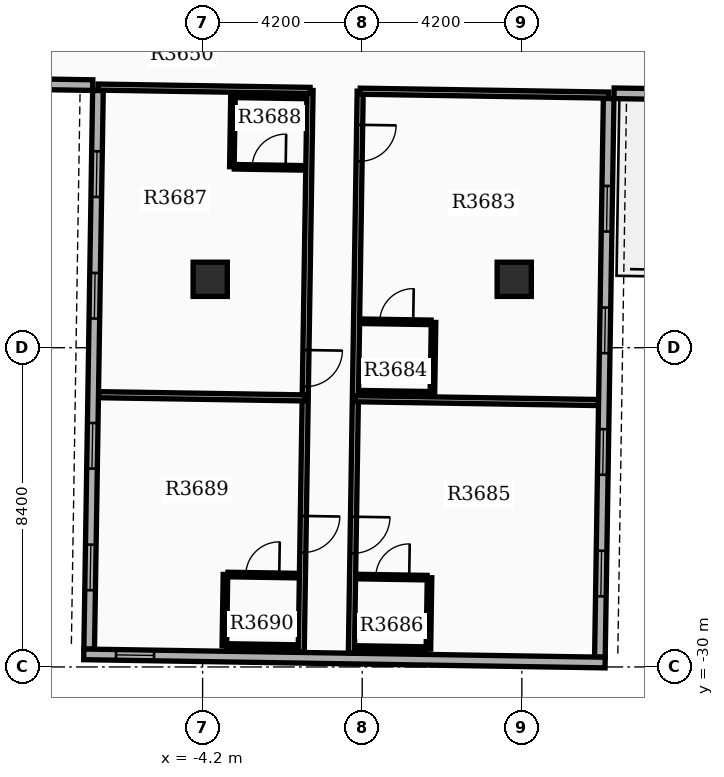
"""IFC4 building model, lengths in metres.
Left out: names, types, materials, properties, quantities, classifications, styles, units other than length and angle.
Written with IfcOpenShell. Run it as: python <this file> out.ifc"""

import sys

from ifc_helpers import new_model, si_unit, direction, frame, frame_2d, origin, origin_2d, place, context, subcontext, project, spatial, rectangle, extrude, element, fill, save


model = new_model("IFC4")
c1 = context("Model", 3, precision=1e-05, world=origin(), true_north=direction((0.0, 1.0)))
c2 = subcontext(c1, "Body", "Model", "MODEL_VIEW")
j1 = project(units=[si_unit("LENGTHUNIT", "METRE"), si_unit("PLANEANGLEUNIT", "RADIAN")], contexts=[c1])
p1 = place(None, origin())
s1 = spatial("IfcSite", under=j1, at=p1, CompositionType="ELEMENT")
p2 = place(p1, origin())
s2 = spatial("IfcBuilding", under=s1, at=p2, CompositionType="ELEMENT")
p3 = place(p2, frame((0.0, 0.0, 228.6)))
s3 = spatial("IfcBuildingStorey", under=s2, at=p3, CompositionType="ELEMENT", Elevation=228.6)
for number, where, z_axis, x_axis in (
    (1, (-4.0, -19.8, 0.0), (0.0, 0.0, 1.0), (1.0, 0.0, 0.0)),
    (2, (4.0, -19.8, 0.0), (0.0, 0.0, 1.0), (1.0, 0.0, 0.0)),
):
    element("IfcColumn", number, at=place(p3, frame(where, z_axis=z_axis, x_axis=x_axis)), inside=s3, PredefinedType="COLUMN", context=c2, shape_type="SweptSolid", body=[
        extrude(rectangle(XDim=0.9, YDim=0.9, at=origin_2d()), origin(), (0.0, 0.0, 1.0), 3.9),
    ])
p4 = place(p3, frame((-6.954, -14.833, 0.0), z_axis=(0.0, 0.0, 1.0), x_axis=(-0.015711302158, -0.999876569875, 0.0)))
e3 = element("IfcWall", 3, at=p4, inside=s3, PredefinedType="STANDARD", context=c2, shape_type="SweptSolid", body=[
    extrude(rectangle(XDim=14.7, YDim=0.28, at=frame_2d((7.35, 0.0))), origin(), (0.0, 0.0, 1.0), 3.18),
])
p5 = place(p4, frame((1.6, 0.0, 0.8)))
e4 = element("IfcOpeningElement", 4, at=p5, cuts=e3, PredefinedType="OPENING", context=c2, shape_type="SweptSolid", body=[
    extrude(rectangle(XDim=1.2, YDim=1.6, at=frame_2d((0.6, 0.8))), frame((0.0, 0.15, 0.0), z_axis=(0.0, -1.0, 0.0), x_axis=(1.0, 0.0, 0.0)), (0.0, 0.0, 1.0), 0.3),
])
p6 = place(p4, frame((4.8, 0.0, 0.8)))
e5 = element("IfcOpeningElement", 5, at=p6, cuts=e3, PredefinedType="OPENING", context=c2, shape_type="SweptSolid", body=[
    extrude(rectangle(XDim=1.2, YDim=1.6, at=frame_2d((0.6, 0.8))), frame((0.0, 0.15, 0.0), z_axis=(0.0, -1.0, 0.0), x_axis=(1.0, 0.0, 0.0)), (0.0, 0.0, 1.0), 0.3),
])
p7 = place(p4, frame((8.75, 0.0, 0.8)))
e6 = element("IfcOpeningElement", 6, at=p7, cuts=e3, PredefinedType="OPENING", context=c2, shape_type="SweptSolid", body=[
    extrude(rectangle(XDim=1.2, YDim=1.6, at=frame_2d((0.6, 0.8))), frame((0.0, 0.15, 0.0), z_axis=(0.0, -1.0, 0.0), x_axis=(1.0, 0.0, 0.0)), (0.0, 0.0, 1.0), 0.3),
])
p8 = place(p4, frame((11.95, 0.0, 0.8)))
e7 = element("IfcOpeningElement", 7, at=p8, cuts=e3, PredefinedType="OPENING", context=c2, shape_type="SweptSolid", body=[
    extrude(rectangle(XDim=1.2, YDim=1.6, at=frame_2d((0.6, 0.8))), frame((0.0, 0.15, 0.0), z_axis=(0.0, -1.0, 0.0), x_axis=(1.0, 0.0, 0.0)), (0.0, 0.0, 1.0), 0.3),
])
p9 = place(p3, frame((6.254, -29.742, 0.0), z_axis=(0.0, 0.0, 1.0), x_axis=(0.015711302158, 0.999876569875, 0.0)))
e8 = element("IfcWall", 8, at=p9, inside=s3, PredefinedType="STANDARD", context=c2, shape_type="SweptSolid", body=[
    extrude(rectangle(XDim=14.7, YDim=0.28, at=frame_2d((7.35, 0.0))), origin(), (0.0, 0.0, 1.0), 3.18),
])
p10 = place(p9, frame((1.6, 0.0, 0.8)))
e9 = element("IfcOpeningElement", 9, at=p10, cuts=e8, PredefinedType="OPENING", context=c2, shape_type="SweptSolid", body=[
    extrude(rectangle(XDim=1.2, YDim=1.6, at=frame_2d((0.6, 0.8))), frame((0.0, 0.15, 0.0), z_axis=(0.0, -1.0, 0.0), x_axis=(1.0, 0.0, 0.0)), (0.0, 0.0, 1.0), 0.3),
])
p11 = place(p9, frame((4.8, 0.0, 0.8)))
e10 = element("IfcOpeningElement", 10, at=p11, cuts=e8, PredefinedType="OPENING", context=c2, shape_type="SweptSolid", body=[
    extrude(rectangle(XDim=1.2, YDim=1.6, at=frame_2d((0.6, 0.8))), frame((0.0, 0.15, 0.0), z_axis=(0.0, -1.0, 0.0), x_axis=(1.0, 0.0, 0.0)), (0.0, 0.0, 1.0), 0.3),
])
p12 = place(p9, frame((8.0, 0.0, 0.8)))
e11 = element("IfcOpeningElement", 11, at=p12, cuts=e8, PredefinedType="OPENING", context=c2, shape_type="SweptSolid", body=[
    extrude(rectangle(XDim=1.2, YDim=1.6, at=frame_2d((0.6, 0.8))), frame((0.0, 0.15, 0.0), z_axis=(0.0, -1.0, 0.0), x_axis=(1.0, 0.0, 0.0)), (0.0, 0.0, 1.0), 0.3),
])
p13 = place(p9, frame((11.2, 0.0, 0.8)))
e12 = element("IfcOpeningElement", 12, at=p13, cuts=e8, PredefinedType="OPENING", context=c2, shape_type="SweptSolid", body=[
    extrude(rectangle(XDim=1.2, YDim=1.6, at=frame_2d((0.6, 0.8))), frame((0.0, 0.15, 0.0), z_axis=(0.0, -1.0, 0.0), x_axis=(1.0, 0.0, 0.0)), (0.0, 0.0, 1.0), 0.3),
])
p14 = place(p3, frame((-7.327, -29.669, 0.0), z_axis=(0.0, 0.0, 1.0), x_axis=(0.999876828887, -0.015694809807, 0.0)))
e13 = element("IfcWall", 13, at=p14, inside=s3, PredefinedType="STANDARD", context=c2, shape_type="SweptSolid", body=[
    extrude(rectangle(XDim=13.72, YDim=0.28, at=frame_2d((6.86, 0.0))), origin(), (0.0, 0.0, 1.0), 3.18),
])
p15 = place(p14, frame((0.85, 0.0, 0.85)))
e14 = element("IfcOpeningElement", 14, at=p15, cuts=e13, PredefinedType="OPENING", context=c2, shape_type="SweptSolid", body=[
    extrude(rectangle(XDim=1.0, YDim=1.5, at=frame_2d((0.5, 0.75))), frame((0.0, 0.15, 0.0), z_axis=(0.0, -1.0, 0.0), x_axis=(1.0, 0.0, 0.0)), (0.0, 0.0, 1.0), 0.3),
])
p16 = place(p3, frame((-13.391, -14.592, 0.0), z_axis=(0.0, 0.0, 1.0), x_axis=(0.999876833368, -0.015694524359, 0.0)))
e15 = element("IfcWall", 15, at=p16, inside=s3, PredefinedType="STANDARD", context=c2, shape_type="SweptSolid", body=[
    extrude(rectangle(XDim=6.3, YDim=0.28, at=frame_2d((3.15, 0.0))), origin(), (0.0, 0.0, 1.0), 3.18),
])
p17 = place(p3, frame((12.926, -15.005, 0.0), z_axis=(0.0, 0.0, 1.0), x_axis=(-0.999876823822, 0.015695132501, 0.0)))
e16 = element("IfcWall", 16, at=p17, inside=s3, PredefinedType="STANDARD", context=c2, shape_type="SweptSolid", body=[
    extrude(rectangle(XDim=6.3, YDim=0.28, at=frame_2d((3.15, 0.0))), origin(), (0.0, 0.0, 1.0), 3.18),
])
p18 = place(p3, frame((-0.053, -14.851, 0.0), z_axis=(0.0, 0.0, 1.0), x_axis=(-0.015706944004, -0.999876638346, 0.0)))
e17 = element("IfcWall", 17, at=p18, inside=s3, PredefinedType="PARTITIONING", context=c2, shape_type="SweptSolid", body=[
    extrude(rectangle(XDim=14.782, YDim=0.16, at=frame_2d((7.391, 0.0))), origin(), (0.0, 0.0, 1.0), 3.17),
])
p19 = place(p18, frame((0.884, 0.0, 0.0)))
e18 = element("IfcOpeningElement", 18, at=p19, cuts=e17, PredefinedType="OPENING", context=c2, shape_type="SweptSolid", body=[
    extrude(rectangle(XDim=0.96, YDim=2.15, at=frame_2d((0.48, 1.075))), frame((0.0, 0.09, 0.0), z_axis=(0.0, -1.0, 0.0), x_axis=(1.0, 0.0, 0.0)), (0.0, 0.0, 1.0), 0.18),
])
p20 = place(p18, frame((11.198, 0.0, 0.0)))
e19 = element("IfcOpeningElement", 19, at=p20, cuts=e17, PredefinedType="OPENING", context=c2, shape_type="SweptSolid", body=[
    extrude(rectangle(XDim=0.96, YDim=2.15, at=frame_2d((0.48, 1.075))), frame((0.0, 0.09, 0.0), z_axis=(0.0, -1.0, 0.0), x_axis=(1.0, 0.0, 0.0)), (0.0, 0.0, 1.0), 0.18),
])
p21 = place(p3, frame((-0.053, -14.851, 0.0), z_axis=(0.0, 0.0, 1.0), x_axis=(0.999877075733, -0.015679076008, 0.0)))
e20 = element("IfcWall", 20, at=p21, inside=s3, PredefinedType="PARTITIONING", context=c2, shape_type="SweptSolid", body=[
    extrude(rectangle(XDim=6.54, YDim=0.16, at=frame_2d((3.27, 0.0))), origin(), (0.0, 0.0, 1.0), 3.17),
])
p22 = place(p3, frame((-0.18, -22.942, 0.0), z_axis=(0.0, 0.0, 1.0), x_axis=(0.999876174287, -0.015736457476, 0.0)))
e21 = element("IfcWall", 21, at=p22, inside=s3, PredefinedType="PARTITIONING", context=c2, shape_type="SweptSolid", body=[
    extrude(rectangle(XDim=6.392, YDim=0.16, at=frame_2d((3.196, 0.0))), origin(), (0.0, 0.0, 1.0), 3.17),
])
p23 = place(p3, frame((-0.008, -20.904, 0.0), z_axis=(0.0, 0.0, 1.0), x_axis=(0.999874688728, -0.015830566654, 0.0)))
e22 = element("IfcWall", 22, at=p23, inside=s3, PredefinedType="PARTITIONING", context=c2, shape_type="SweptSolid", body=[
    extrude(rectangle(XDim=1.82, YDim=0.12, at=frame_2d((0.91, 0.0))), origin(), (0.0, 0.0, 1.0), 3.17),
])
p24 = place(p23, frame((0.47, 0.0, 0.0)))
e23 = element("IfcOpeningElement", 23, at=p24, cuts=e22, PredefinedType="OPENING", context=c2, shape_type="SweptSolid", body=[
    extrude(rectangle(XDim=0.88, YDim=2.1, at=frame_2d((0.44, 1.05))), frame((0.0, 0.07, 0.0), z_axis=(0.0, -1.0, 0.0), x_axis=(1.0, 0.0, 0.0)), (0.0, 0.0, 1.0), 0.14),
])
p25 = place(p3, frame((-0.038, -22.784, 0.0), z_axis=(0.0, 0.0, 1.0), x_axis=(0.999876836305, -0.015694337248, 0.0)))
e24 = element("IfcWall", 24, at=p25, inside=s3, PredefinedType="PARTITIONING", context=c2, shape_type="SweptSolid", body=[
    extrude(rectangle(XDim=1.82, YDim=0.12, at=frame_2d((0.91, 0.0))), origin(), (0.0, 0.0, 1.0), 3.17),
])
p26 = place(p3, frame((1.876, -20.934, 0.0), z_axis=(0.0, 0.0, 1.0), x_axis=(-0.015714386166, -0.99987652141, 0.0)))
e25 = element("IfcWall", 25, at=p26, inside=s3, PredefinedType="PARTITIONING", context=c2, shape_type="SweptSolid", body=[
    extrude(rectangle(XDim=1.88, YDim=0.12, at=frame_2d((0.94, 0.0))), origin(), (0.0, 0.0, 1.0), 3.17),
])
p27 = place(p3, frame((-0.114, -27.622, 0.0), z_axis=(0.0, 0.0, 1.0), x_axis=(0.999876836305, -0.015694337248, 0.0)))
e26 = element("IfcWall", 26, at=p27, inside=s3, PredefinedType="PARTITIONING", context=c2, shape_type="SweptSolid", body=[
    extrude(rectangle(XDim=1.82, YDim=0.12, at=frame_2d((0.91, 0.0))), origin(), (0.0, 0.0, 1.0), 3.17),
])
p28 = place(p27, frame((0.47, 0.0, 0.0)))
e27 = element("IfcOpeningElement", 27, at=p28, cuts=e26, PredefinedType="OPENING", context=c2, shape_type="SweptSolid", body=[
    extrude(rectangle(XDim=0.88, YDim=2.1, at=frame_2d((0.44, 1.05))), frame((0.0, 0.07, 0.0), z_axis=(0.0, -1.0, 0.0), x_axis=(1.0, 0.0, 0.0)), (0.0, 0.0, 1.0), 0.14),
])
p29 = place(p3, frame((-0.143, -29.501, 0.0), z_axis=(0.0, 0.0, 1.0), x_axis=(0.999876836305, -0.015694337248, 0.0)))
e28 = element("IfcWall", 28, at=p29, inside=s3, PredefinedType="PARTITIONING", context=c2, shape_type="SweptSolid", body=[
    extrude(rectangle(XDim=1.82, YDim=0.12, at=frame_2d((0.91, 0.0))), origin(), (0.0, 0.0, 1.0), 3.17),
])
p30 = place(p3, frame((1.771, -27.651, 0.0), z_axis=(0.0, 0.0, 1.0), x_axis=(-0.01571234584, -0.999876553475, 0.0)))
e29 = element("IfcWall", 29, at=p30, inside=s3, PredefinedType="PARTITIONING", context=c2, shape_type="SweptSolid", body=[
    extrude(rectangle(XDim=1.88, YDim=0.12, at=frame_2d((0.94, 0.0))), origin(), (0.0, 0.0, 1.0), 3.17),
])
p31 = place(p3, frame((-1.373, -14.83, 0.0), z_axis=(0.0, 0.0, 1.0), x_axis=(-0.015706684621, -0.999876642421, 0.0)))
e30 = element("IfcWall", 30, at=p31, inside=s3, PredefinedType="PARTITIONING", context=c2, shape_type="SweptSolid", body=[
    extrude(rectangle(XDim=14.782, YDim=0.16, at=frame_2d((7.391, 0.0))), origin(), (0.0, 0.0, 1.0), 3.17),
])
p32 = place(p31, frame((6.832, 0.0, 0.0)))
e31 = element("IfcOpeningElement", 31, at=p32, cuts=e30, PredefinedType="OPENING", context=c2, shape_type="SweptSolid", body=[
    extrude(rectangle(XDim=0.96, YDim=2.15, at=frame_2d((0.48, 1.075))), frame((0.0, 0.09, 0.0), z_axis=(0.0, -1.0, 0.0), x_axis=(1.0, 0.0, 0.0)), (0.0, 0.0, 1.0), 0.18),
])
p33 = place(p31, frame((11.198, 0.0, 0.0)))
e32 = element("IfcOpeningElement", 32, at=p33, cuts=e30, PredefinedType="OPENING", context=c2, shape_type="SweptSolid", body=[
    extrude(rectangle(XDim=0.96, YDim=2.15, at=frame_2d((0.48, 1.075))), frame((0.0, 0.09, 0.0), z_axis=(0.0, -1.0, 0.0), x_axis=(1.0, 0.0, 0.0)), (0.0, 0.0, 1.0), 0.18),
])
p34 = place(p3, frame((-1.373, -14.83, 0.0), z_axis=(0.0, 0.0, 1.0), x_axis=(-0.999876634964, 0.015707159321, 0.0)))
e33 = element("IfcWall", 33, at=p34, inside=s3, PredefinedType="PARTITIONING", context=c2, shape_type="SweptSolid", body=[
    extrude(rectangle(XDim=5.58, YDim=0.16, at=frame_2d((2.79, 0.0))), origin(), (0.0, 0.0, 1.0), 3.17),
])
p35 = place(p3, frame((-1.5, -22.921, 0.0), z_axis=(0.0, 0.0, 1.0), x_axis=(-0.999876256724, 0.015731218639, 0.0)))
e34 = element("IfcWall", 34, at=p35, inside=s3, PredefinedType="PARTITIONING", context=c2, shape_type="SweptSolid", body=[
    extrude(rectangle(XDim=5.432, YDim=0.16, at=frame_2d((2.716, 0.0))), origin(), (0.0, 0.0, 1.0), 3.17),
])
p36 = place(p3, frame((-3.365, -16.839, 0.0), z_axis=(0.0, 0.0, 1.0), x_axis=(0.999874722342, -0.015828443418, 0.0)))
e35 = element("IfcWall", 35, at=p36, inside=s3, PredefinedType="PARTITIONING", context=c2, shape_type="SweptSolid", body=[
    extrude(rectangle(XDim=1.82, YDim=0.12, at=frame_2d((0.91, 0.0))), origin(), (0.0, 0.0, 1.0), 3.17),
])
p37 = place(p36, frame((0.47, 0.0, 0.0)))
e36 = element("IfcOpeningElement", 36, at=p37, cuts=e35, PredefinedType="OPENING", context=c2, shape_type="SweptSolid", body=[
    extrude(rectangle(XDim=0.88, YDim=2.1, at=frame_2d((0.44, 1.05))), frame((0.0, 0.07, 0.0), z_axis=(0.0, -1.0, 0.0), x_axis=(1.0, 0.0, 0.0)), (0.0, 0.0, 1.0), 0.14),
])
p38 = place(p3, frame((-3.335, -14.959, 0.0), z_axis=(0.0, 0.0, 1.0), x_axis=(0.999876836305, -0.015694337248, 0.0)))
e37 = element("IfcWall", 37, at=p38, inside=s3, PredefinedType="PARTITIONING", context=c2, shape_type="SweptSolid", body=[
    extrude(rectangle(XDim=1.82, YDim=0.12, at=frame_2d((0.91, 0.0))), origin(), (0.0, 0.0, 1.0), 3.17),
])
p39 = place(p3, frame((-3.4, -14.958, 0.0), z_axis=(0.0, 0.0, 1.0), x_axis=(-0.015714386166, -0.99987652141, 0.0)))
e38 = element("IfcWall", 38, at=p39, inside=s3, PredefinedType="PARTITIONING", context=c2, shape_type="SweptSolid", body=[
    extrude(rectangle(XDim=1.88, YDim=0.12, at=frame_2d((0.94, 0.0))), origin(), (0.0, 0.0, 1.0), 3.17),
])
p40 = place(p3, frame((-3.533, -27.568, 0.0), z_axis=(0.0, 0.0, 1.0), x_axis=(0.999876836305, -0.015694337248, 0.0)))
e39 = element("IfcWall", 39, at=p40, inside=s3, PredefinedType="PARTITIONING", context=c2, shape_type="SweptSolid", body=[
    extrude(rectangle(XDim=1.82, YDim=0.12, at=frame_2d((0.91, 0.0))), origin(), (0.0, 0.0, 1.0), 3.17),
])
p41 = place(p40, frame((0.47, 0.0, 0.0)))
e40 = element("IfcOpeningElement", 40, at=p41, cuts=e39, PredefinedType="OPENING", context=c2, shape_type="SweptSolid", body=[
    extrude(rectangle(XDim=0.88, YDim=2.1, at=frame_2d((0.44, 1.05))), frame((0.0, 0.07, 0.0), z_axis=(0.0, -1.0, 0.0), x_axis=(1.0, 0.0, 0.0)), (0.0, 0.0, 1.0), 0.14),
])
p42 = place(p3, frame((-3.563, -29.448, 0.0), z_axis=(0.0, 0.0, 1.0), x_axis=(0.999876836305, -0.015694337248, 0.0)))
e41 = element("IfcWall", 41, at=p42, inside=s3, PredefinedType="PARTITIONING", context=c2, shape_type="SweptSolid", body=[
    extrude(rectangle(XDim=1.82, YDim=0.12, at=frame_2d((0.91, 0.0))), origin(), (0.0, 0.0, 1.0), 3.17),
])
p43 = place(p3, frame((-3.598, -27.567, 0.0), z_axis=(0.0, 0.0, 1.0), x_axis=(-0.015714386166, -0.99987652141, 0.0)))
e42 = element("IfcWall", 42, at=p43, inside=s3, PredefinedType="PARTITIONING", context=c2, shape_type="SweptSolid", body=[
    extrude(rectangle(XDim=1.88, YDim=0.12, at=frame_2d((0.94, 0.0))), origin(), (0.0, 0.0, 1.0), 3.17),
])
p44 = place(p5, origin())
e43 = element("IfcWindow", 43, at=p44, inside=s3, PartitioningType="SINGLE_PANEL", PredefinedType="WINDOW", context=c2, shape_type="SweptSolid", body=[
    extrude(rectangle(XDim=1.2, YDim=1.6, at=frame_2d((0.6, 0.8))), frame((0.0, 0.03, 0.0), z_axis=(0.0, -1.0, 0.0), x_axis=(1.0, 0.0, 0.0)), (0.0, 0.0, 1.0), 0.06),
])
fill(e4, e43)
p45 = place(p6, origin())
e44 = element("IfcWindow", 44, at=p45, inside=s3, PartitioningType="SINGLE_PANEL", PredefinedType="WINDOW", context=c2, shape_type="SweptSolid", body=[
    extrude(rectangle(XDim=1.2, YDim=1.6, at=frame_2d((0.6, 0.8))), frame((0.0, 0.03, 0.0), z_axis=(0.0, -1.0, 0.0), x_axis=(1.0, 0.0, 0.0)), (0.0, 0.0, 1.0), 0.06),
])
fill(e5, e44)
p46 = place(p7, origin())
e45 = element("IfcWindow", 45, at=p46, inside=s3, PartitioningType="SINGLE_PANEL", PredefinedType="WINDOW", context=c2, shape_type="SweptSolid", body=[
    extrude(rectangle(XDim=1.2, YDim=1.6, at=frame_2d((0.6, 0.8))), frame((0.0, 0.03, 0.0), z_axis=(0.0, -1.0, 0.0), x_axis=(1.0, 0.0, 0.0)), (0.0, 0.0, 1.0), 0.06),
])
fill(e6, e45)
p47 = place(p8, origin())
e46 = element("IfcWindow", 46, at=p47, inside=s3, PartitioningType="SINGLE_PANEL", PredefinedType="WINDOW", context=c2, shape_type="SweptSolid", body=[
    extrude(rectangle(XDim=1.2, YDim=1.6, at=frame_2d((0.6, 0.8))), frame((0.0, 0.03, 0.0), z_axis=(0.0, -1.0, 0.0), x_axis=(1.0, 0.0, 0.0)), (0.0, 0.0, 1.0), 0.06),
])
fill(e7, e46)
p48 = place(p10, origin())
e47 = element("IfcWindow", 47, at=p48, inside=s3, PartitioningType="SINGLE_PANEL", PredefinedType="WINDOW", context=c2, shape_type="SweptSolid", body=[
    extrude(rectangle(XDim=1.2, YDim=1.6, at=frame_2d((0.6, 0.8))), frame((0.0, 0.03, 0.0), z_axis=(0.0, -1.0, 0.0), x_axis=(1.0, 0.0, 0.0)), (0.0, 0.0, 1.0), 0.06),
])
fill(e9, e47)
p49 = place(p11, origin())
e48 = element("IfcWindow", 48, at=p49, inside=s3, PartitioningType="SINGLE_PANEL", PredefinedType="WINDOW", context=c2, shape_type="SweptSolid", body=[
    extrude(rectangle(XDim=1.2, YDim=1.6, at=frame_2d((0.6, 0.8))), frame((0.0, 0.03, 0.0), z_axis=(0.0, -1.0, 0.0), x_axis=(1.0, 0.0, 0.0)), (0.0, 0.0, 1.0), 0.06),
])
fill(e10, e48)
p50 = place(p12, origin())
e49 = element("IfcWindow", 49, at=p50, inside=s3, PartitioningType="SINGLE_PANEL", PredefinedType="WINDOW", context=c2, shape_type="SweptSolid", body=[
    extrude(rectangle(XDim=1.2, YDim=1.6, at=frame_2d((0.6, 0.8))), frame((0.0, 0.03, 0.0), z_axis=(0.0, -1.0, 0.0), x_axis=(1.0, 0.0, 0.0)), (0.0, 0.0, 1.0), 0.06),
])
fill(e11, e49)
p51 = place(p13, origin())
e50 = element("IfcWindow", 50, at=p51, inside=s3, PartitioningType="SINGLE_PANEL", PredefinedType="WINDOW", context=c2, shape_type="SweptSolid", body=[
    extrude(rectangle(XDim=1.2, YDim=1.6, at=frame_2d((0.6, 0.8))), frame((0.0, 0.03, 0.0), z_axis=(0.0, -1.0, 0.0), x_axis=(1.0, 0.0, 0.0)), (0.0, 0.0, 1.0), 0.06),
])
fill(e12, e50)
p52 = place(p15, origin())
e51 = element("IfcWindow", 51, at=p52, inside=s3, PartitioningType="SINGLE_PANEL", PredefinedType="WINDOW", context=c2, shape_type="SweptSolid", body=[
    extrude(rectangle(XDim=1.0, YDim=1.5, at=frame_2d((0.5, 0.75))), frame((0.0, 0.03, 0.0), z_axis=(0.0, -1.0, 0.0), x_axis=(1.0, 0.0, 0.0)), (0.0, 0.0, 1.0), 0.06),
])
fill(e14, e51)
p53 = place(p19, origin())
e52 = element("IfcDoor", 52, at=p53, inside=s3, OperationType="SINGLE_SWING_LEFT", PredefinedType="DOOR", context=c2, shape_type="SweptSolid", body=[
    extrude(rectangle(XDim=0.96, YDim=2.15, at=frame_2d((0.48, 1.075))), frame((0.0, 0.025, 0.0), z_axis=(0.0, -1.0, 0.0), x_axis=(1.0, 0.0, 0.0)), (0.0, 0.0, 1.0), 0.05),
])
fill(e18, e52)
p54 = place(p24, origin())
e53 = element("IfcDoor", 53, at=p54, inside=s3, OperationType="SINGLE_SWING_RIGHT", PredefinedType="DOOR", context=c2, shape_type="SweptSolid", body=[
    extrude(rectangle(XDim=0.88, YDim=2.1, at=frame_2d((0.44, 1.05))), frame((0.0, 0.025, 0.0), z_axis=(0.0, -1.0, 0.0), x_axis=(1.0, 0.0, 0.0)), (0.0, 0.0, 1.0), 0.05),
])
fill(e23, e53)
p55 = place(p20, origin())
e54 = element("IfcDoor", 54, at=p55, inside=s3, OperationType="SINGLE_SWING_LEFT", PredefinedType="DOOR", context=c2, shape_type="SweptSolid", body=[
    extrude(rectangle(XDim=0.96, YDim=2.15, at=frame_2d((0.48, 1.075))), frame((0.0, 0.025, 0.0), z_axis=(0.0, -1.0, 0.0), x_axis=(1.0, 0.0, 0.0)), (0.0, 0.0, 1.0), 0.05),
])
fill(e19, e54)
p56 = place(p28, origin())
e55 = element("IfcDoor", 55, at=p56, inside=s3, OperationType="SINGLE_SWING_RIGHT", PredefinedType="DOOR", context=c2, shape_type="SweptSolid", body=[
    extrude(rectangle(XDim=0.88, YDim=2.1, at=frame_2d((0.44, 1.05))), frame((0.0, 0.025, 0.0), z_axis=(0.0, -1.0, 0.0), x_axis=(1.0, 0.0, 0.0)), (0.0, 0.0, 1.0), 0.05),
])
fill(e27, e55)
p57 = place(p32, origin())
e56 = element("IfcDoor", 56, at=p57, inside=s3, OperationType="SINGLE_SWING_LEFT", PredefinedType="DOOR", context=c2, shape_type="SweptSolid", body=[
    extrude(rectangle(XDim=0.96, YDim=2.15, at=frame_2d((0.48, 1.075))), frame((0.0, 0.025, 0.0), z_axis=(0.0, -1.0, 0.0), x_axis=(1.0, 0.0, 0.0)), (0.0, 0.0, 1.0), 0.05),
])
fill(e31, e56)
p58 = place(p37, origin())
e57 = element("IfcDoor", 57, at=p58, inside=s3, OperationType="SINGLE_SWING_RIGHT", PredefinedType="DOOR", context=c2, shape_type="SweptSolid", body=[
    extrude(rectangle(XDim=0.88, YDim=2.1, at=frame_2d((0.44, 1.05))), frame((0.0, 0.025, 0.0), z_axis=(0.0, -1.0, 0.0), x_axis=(1.0, 0.0, 0.0)), (0.0, 0.0, 1.0), 0.05),
])
fill(e36, e57)
p59 = place(p33, origin())
e58 = element("IfcDoor", 58, at=p59, inside=s3, OperationType="SINGLE_SWING_LEFT", PredefinedType="DOOR", context=c2, shape_type="SweptSolid", body=[
    extrude(rectangle(XDim=0.96, YDim=2.15, at=frame_2d((0.48, 1.075))), frame((0.0, 0.025, 0.0), z_axis=(0.0, -1.0, 0.0), x_axis=(1.0, 0.0, 0.0)), (0.0, 0.0, 1.0), 0.05),
])
fill(e32, e58)
p60 = place(p41, origin())
e59 = element("IfcDoor", 59, at=p60, inside=s3, OperationType="SINGLE_SWING_RIGHT", PredefinedType="DOOR", context=c2, shape_type="SweptSolid", body=[
    extrude(rectangle(XDim=0.88, YDim=2.1, at=frame_2d((0.44, 1.05))), frame((0.0, 0.025, 0.0), z_axis=(0.0, -1.0, 0.0), x_axis=(1.0, 0.0, 0.0)), (0.0, 0.0, 1.0), 0.05),
])
fill(e40, e59)
save(model, sys.argv[1])
